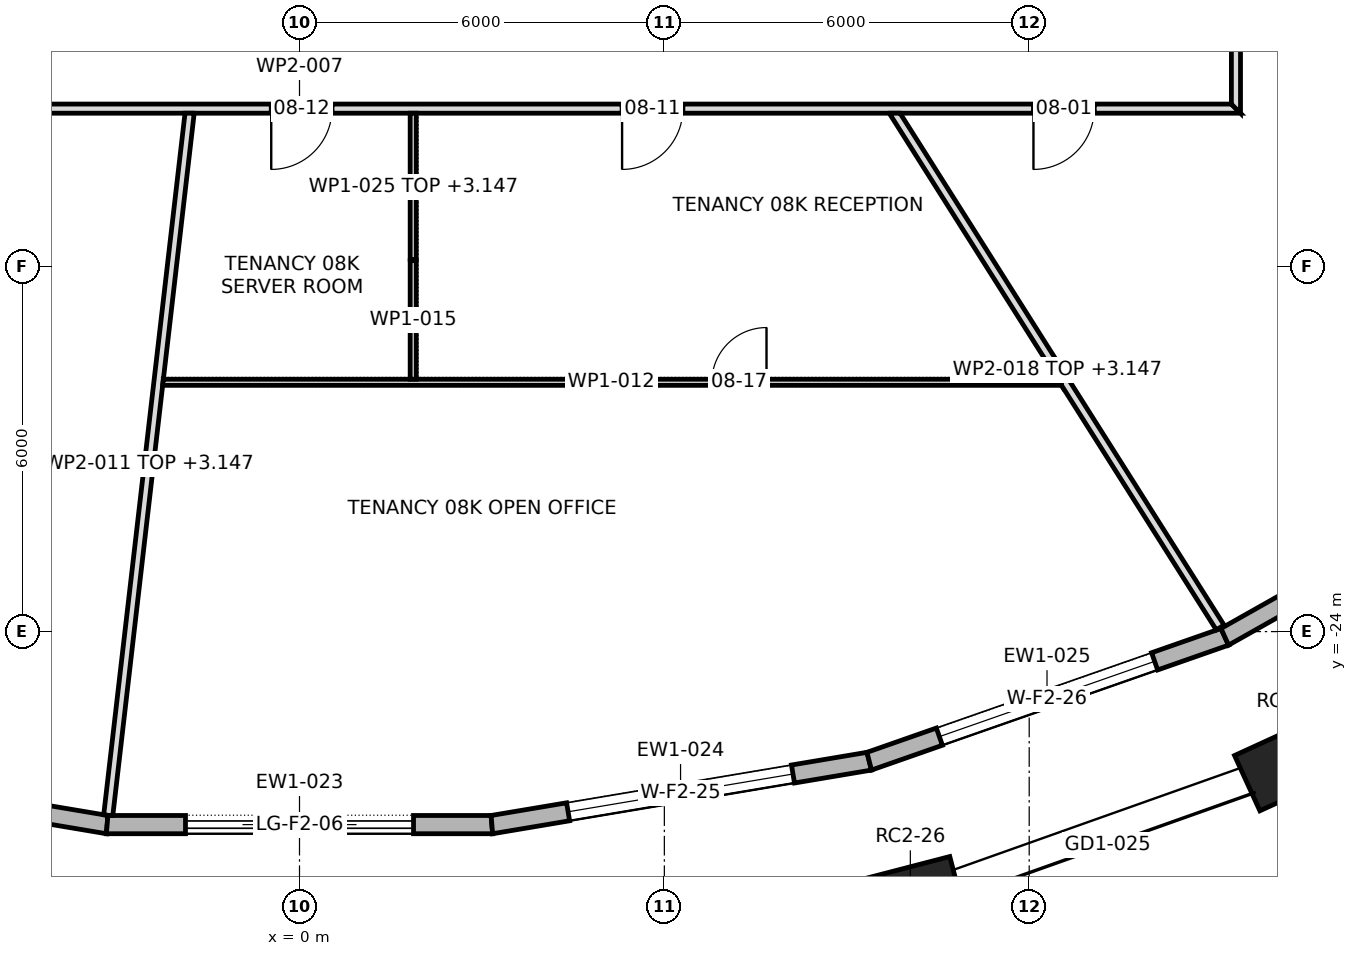
"""IFC4 building model, lengths in metres.
Left out: names, types, materials, properties, quantities, classifications, styles, units other than length and angle.
Written with IfcOpenShell. Run it as: python <this file> out.ifc"""

import sys

from ifc_helpers import new_model, si_unit, direction, frame, frame_2d, origin, origin_2d, place, context, subcontext, project, spatial, polyline, rectangle, outline, extrude, element, fill, save


model = new_model("IFC4")
c1 = context("Model", 3, precision=1e-05, world=origin(), true_north=direction((0.0, 1.0)))
c2 = subcontext(c1, "Body", "Model", "MODEL_VIEW")
j1 = project(units=[si_unit("LENGTHUNIT", "METRE"), si_unit("PLANEANGLEUNIT", "RADIAN")], contexts=[c1])
p1 = place(None, origin())
s1 = spatial("IfcSite", under=j1, at=p1, CompositionType="ELEMENT")
p2 = place(p1, origin())
s2 = spatial("IfcBuilding", under=s1, at=p2, CompositionType="ELEMENT")
p3 = place(p2, frame((0.0, 0.0, 125.5)))
s3 = spatial("IfcBuildingStorey", under=s2, at=p3, CompositionType="ELEMENT", Elevation=125.5)
for number, where, z_axis, x_axis in (
    (1, (10.045, -28.385, 0.0), (0.0, 0.0, 1.0), (0.968, 0.252, 0.0)),
    (2, (16.313, -26.159, 0.0), (0.0, 0.0, 1.0), (0.909, 0.417, 0.0)),
):
    element("IfcColumn", number, at=place(p3, frame(where, z_axis=z_axis, x_axis=x_axis)), inside=s3, PredefinedType="COLUMN", context=c2, shape_type="SweptSolid", body=[
        extrude(rectangle(XDim=1.6, YDim=1.0, at=origin_2d()), origin(), (0.0, 0.0, 1.0), 4.2),
    ])
p4 = place(p3, frame((-9.369, -26.131, 0.0), z_axis=(0.0, 0.0, 1.0), x_axis=(0.986176011722, -0.165701158427, 0.0)))
e3 = element("IfcWall", 3, at=p4, inside=s3, PredefinedType="STANDARD", context=c2, shape_type="SweptSolid", body=[
    extrude(outline(polyline([(-0.013, -0.15), (6.305, -0.15), (6.28, 0.15), (0.013, 0.15), (-0.013, -0.15)])), origin(), (0.0, 0.0, 1.0), 3.9),
])
p5 = place(p4, frame((1.271, 0.0, 0.6)))
e4 = element("IfcOpeningElement", 4, at=p5, cuts=e3, PredefinedType="OPENING", context=c2, shape_type="SweptSolid", body=[
    extrude(rectangle(XDim=3.75, YDim=2.85, at=frame_2d((1.875, 1.425))), frame((0.0, 0.162, 0.0), z_axis=(0.0, -1.0, 0.0), x_axis=(1.0, 0.0, 0.0)), (0.0, 0.0, 1.0), 0.324),
])
p6 = place(p3, frame((-3.164, -27.174, 0.0), z_axis=(0.0, 0.0, 1.0), x_axis=(1.0, 0.0, 0.0)))
e5 = element("IfcWall", 5, at=p6, inside=s3, PredefinedType="STANDARD", context=c2, shape_type="SweptSolid", body=[
    extrude(outline(polyline([(-0.012, -0.15), (6.34, -0.15), (6.315, 0.15), (0.012, 0.15), (-0.012, -0.15)])), origin(), (0.0, 0.0, 1.0), 3.9),
])
p7 = place(p6, frame((1.289, 0.0, 0.0)))
e6 = element("IfcOpeningElement", 6, at=p7, cuts=e5, PredefinedType="OPENING", context=c2, shape_type="SweptSolid", body=[
    extrude(rectangle(XDim=3.75, YDim=3.45, at=frame_2d((1.875, 1.725))), frame((0.0, 0.162, 0.0), z_axis=(0.0, -1.0, 0.0), x_axis=(1.0, 0.0, 0.0)), (0.0, 0.0, 1.0), 0.324),
])
p8 = place(p3, frame((3.164, -27.174, 0.0), z_axis=(0.0, 0.0, 1.0), x_axis=(0.986176011722, 0.165701158427, 0.0)))
e7 = element("IfcWall", 7, at=p8, inside=s3, PredefinedType="STANDARD", context=c2, shape_type="SweptSolid", body=[
    extrude(outline(polyline([(-0.012, -0.15), (6.305, -0.15), (6.28, 0.15), (0.012, 0.15), (-0.012, -0.15)])), origin(), (0.0, 0.0, 1.0), 3.9),
])
p9 = place(p8, frame((1.271, 0.0, 0.6)))
e8 = element("IfcOpeningElement", 8, at=p9, cuts=e7, PredefinedType="OPENING", context=c2, shape_type="SweptSolid", body=[
    extrude(rectangle(XDim=3.75, YDim=2.85, at=frame_2d((1.875, 1.425))), frame((0.0, 0.162, 0.0), z_axis=(0.0, -1.0, 0.0), x_axis=(1.0, 0.0, 0.0)), (0.0, 0.0, 1.0), 0.324),
])
p10 = place(p3, frame((9.369, -26.131, 0.0), z_axis=(0.0, 0.0, 1.0), x_axis=(0.94389706045, 0.330239820849, 0.0)))
e9 = element("IfcWall", 9, at=p10, inside=s3, PredefinedType="STANDARD", context=c2, shape_type="SweptSolid", body=[
    extrude(outline(polyline([(-0.013, -0.15), (6.208, -0.15), (6.181, 0.15), (0.013, 0.15), (-0.013, -0.15)])), origin(), (0.0, 0.0, 1.0), 3.9),
])
p11 = place(p10, frame((1.222, 0.0, 0.6)))
e10 = element("IfcOpeningElement", 10, at=p11, cuts=e9, PredefinedType="OPENING", context=c2, shape_type="SweptSolid", body=[
    extrude(rectangle(XDim=3.75, YDim=2.85, at=frame_2d((1.875, 1.425))), frame((0.0, 0.162, 0.0), z_axis=(0.0, -1.0, 0.0), x_axis=(1.0, 0.0, 0.0)), (0.0, 0.0, 1.0), 0.324),
])
p12 = place(p3, frame((15.216, -24.086, 0.0), z_axis=(0.0, 0.0, 1.0), x_axis=(0.870858332497, 0.491534093142, 0.0)))
e11 = element("IfcWall", 11, at=p12, inside=s3, PredefinedType="STANDARD", context=c2, shape_type="SweptSolid", body=[
    extrude(outline(polyline([(-0.013, -0.15), (6.058, -0.15), (6.03, 0.15), (0.013, 0.15), (-0.013, -0.15)])), origin(), (0.0, 0.0, 1.0), 3.9),
])
p13 = place(p12, frame((1.147, 0.0, 0.6)))
e12 = element("IfcOpeningElement", 12, at=p13, cuts=e11, PredefinedType="OPENING", context=c2, shape_type="SweptSolid", body=[
    extrude(rectangle(XDim=3.75, YDim=2.85, at=frame_2d((1.875, 1.425))), frame((0.0, 0.162, 0.0), z_axis=(0.0, -1.0, 0.0), x_axis=(1.0, 0.0, 0.0)), (0.0, 0.0, 1.0), 0.324),
])
p14 = place(p3, frame((-15.475, -15.4, 0.0), z_axis=(0.0, 0.0, 1.0), x_axis=(1.0, 0.0, 0.0)))
e13 = element("IfcWall", 13, at=p14, inside=s3, PredefinedType="PARTITIONING", context=c2, shape_type="SweptSolid", body=[
    extrude(outline(polyline([(0.0, -0.075), (1.935, -0.075), (3.869, -0.075), (5.803, -0.075), (7.738, -0.075), (9.672, -0.075), (11.606, -0.075), (13.541, -0.075), (15.475, -0.075), (17.409, -0.075), (19.344, -0.075), (21.278, -0.075), (23.212, -0.075), (25.147, -0.075), (27.081, -0.075), (29.016, -0.075), (30.95, -0.075), (30.8, 0.075), (28.885, 0.075), (26.969, 0.075), (25.053, 0.075), (23.138, 0.075), (21.222, 0.075), (19.306, 0.075), (17.391, 0.075), (15.475, 0.075), (13.56, 0.075), (11.644, 0.075), (9.728, 0.075), (7.812, 0.075), (5.897, 0.075), (3.981, 0.075), (2.066, 0.075), (0.15, 0.075), (0.0, -0.075)])), origin(), (0.0, 0.0, 1.0), 3.9),
])
p15 = place(p14, frame((27.545, 0.0, 0.0)))
e14 = element("IfcOpeningElement", 14, at=p15, cuts=e13, PredefinedType="OPENING", context=c2, shape_type="SweptSolid", body=[
    extrude(rectangle(XDim=1.0, YDim=2.1, at=frame_2d((0.5, 1.05))), frame((0.0, 0.087, 0.0), z_axis=(0.0, -1.0, 0.0), x_axis=(1.0, 0.0, 0.0)), (0.0, 0.0, 1.0), 0.174),
])
p16 = place(p14, frame((5.975, 0.0, 0.0)))
e15 = element("IfcOpeningElement", 15, at=p16, cuts=e13, PredefinedType="OPENING", context=c2, shape_type="SweptSolid", body=[
    extrude(rectangle(XDim=1.8, YDim=2.1, at=frame_2d((0.9, 1.05))), frame((0.0, 0.087, 0.0), z_axis=(0.0, -1.0, 0.0), x_axis=(1.0, 0.0, 0.0)), (0.0, 0.0, 1.0), 0.174),
])
p17 = place(p14, frame((20.78, 0.0, 0.0)))
e16 = element("IfcOpeningElement", 16, at=p17, cuts=e13, PredefinedType="OPENING", context=c2, shape_type="SweptSolid", body=[
    extrude(rectangle(XDim=1.0, YDim=2.1, at=frame_2d((0.5, 1.05))), frame((0.0, 0.087, 0.0), z_axis=(0.0, -1.0, 0.0), x_axis=(1.0, 0.0, 0.0)), (0.0, 0.0, 1.0), 0.174),
])
p18 = place(p14, frame((15.01, 0.0, 0.0)))
e17 = element("IfcOpeningElement", 17, at=p18, cuts=e13, PredefinedType="OPENING", context=c2, shape_type="SweptSolid", body=[
    extrude(rectangle(XDim=1.0, YDim=2.1, at=frame_2d((0.5, 1.05))), frame((0.0, 0.087, 0.0), z_axis=(0.0, -1.0, 0.0), x_axis=(1.0, 0.0, 0.0)), (0.0, 0.0, 1.0), 0.174),
])
p19 = place(p3, frame((-3.145, -27.021, 0.0), z_axis=(0.0, 0.0, 1.0), x_axis=(0.115127596958, 0.993350711692, 0.0)))
e18 = element("IfcWall", 18, at=p19, inside=s3, PredefinedType="PARTITIONING", context=c2, shape_type="SweptSolid", body=[
    extrude(outline(polyline([(0.006, -0.075), (1.808, -0.075), (3.611, -0.075), (5.414, -0.075), (7.217, -0.075), (7.228, -0.074), (7.228, -0.075), (8.696, -0.075), (10.164, -0.075), (11.632, -0.075), (11.632, -0.072), (11.615, 0.075), (9.679, 0.075), (7.743, 0.075), (5.807, 0.075), (3.872, 0.075), (1.936, 0.075), (0.0, 0.075), (0.0, -0.027), (0.006, -0.075)])), origin(), (0.0, 0.0, 1.0), 3.147),
])
p20 = place(p3, frame((-2.25, -19.9, 0.0), z_axis=(0.0, 0.0, 1.0), x_axis=(1.0, 0.0, 0.0)))
e19 = element("IfcWall", 19, at=p20, inside=s3, PredefinedType="PARTITIONING", context=c2, shape_type="SweptSolid", body=[
    extrude(outline(polyline([(14.781, -0.05), (14.781, -0.05), (14.77, -0.032), (14.77, -0.032), (14.718, 0.05), (12.96, 0.05), (11.202, 0.05), (9.444, 0.05), (7.686, 0.05), (5.928, 0.05), (4.17, 0.05), (4.17, 0.05), (4.07, 0.05), (4.07, 0.05), (2.717, 0.05), (1.364, 0.05), (0.011, 0.05), (0.0, -0.048), (0.0, -0.05), (1.848, -0.05), (3.695, -0.05), (5.543, -0.05), (7.391, -0.05), (9.238, -0.05), (11.086, -0.05), (12.933, -0.05), (14.781, -0.05)])), origin(), (0.0, 0.0, 1.0), 3.9),
])
p21 = place(p20, frame((9.03, 0.0, 0.0)))
e20 = element("IfcOpeningElement", 20, at=p21, cuts=e19, PredefinedType="OPENING", context=c2, shape_type="SweptSolid", body=[
    extrude(rectangle(XDim=0.9, YDim=2.1, at=frame_2d((0.45, 1.05))), frame((0.0, 0.062, 0.0), z_axis=(0.0, -1.0, 0.0), x_axis=(1.0, 0.0, 0.0)), (0.0, 0.0, 1.0), 0.124),
])
p22 = place(p3, frame((1.87, -19.85, 0.0), z_axis=(0.0, 0.0, 1.0), x_axis=(0.0, 1.0, 0.0)))
e21 = element("IfcWall", 21, at=p22, inside=s3, PredefinedType="PARTITIONING", context=c2, shape_type="SweptSolid", body=[
    extrude(rectangle(XDim=1.96, YDim=0.1, at=frame_2d((0.98, 0.0))), origin(), (0.0, 0.0, 1.0), 3.9),
])
p23 = place(p3, frame((9.762, -15.435, 0.0), z_axis=(0.0, 0.0, 1.0), x_axis=(0.534830284385, -0.844959506074, 0.0)))
e22 = element("IfcWall", 22, at=p23, inside=s3, PredefinedType="PARTITIONING", context=c2, shape_type="SweptSolid", body=[
    extrude(outline(polyline([(0.0, -0.075), (1.726, -0.075), (3.452, -0.075), (5.177, -0.075), (5.211, -0.022), (5.295, -0.075), (6.883, -0.075), (8.47, -0.075), (10.057, -0.075), (10.057, 0.075), (8.064, 0.075), (6.072, 0.075), (4.08, 0.075), (2.087, 0.075), (0.095, 0.075), (0.0, -0.075), (0.0, -0.075)])), origin(), (0.0, 0.0, 1.0), 3.147),
])
p24 = place(p3, frame((15.4, -15.475, 0.0), z_axis=(0.0, 0.0, 1.0), x_axis=(0.0, 1.0, 0.0)))
e23 = element("IfcWall", 23, at=p24, inside=s3, PredefinedType="PARTITIONING", context=c2, shape_type="SweptSolid", body=[
    extrude(outline(polyline([(0.0, -0.075), (1.935, -0.075), (3.869, -0.075), (5.803, -0.075), (7.738, -0.075), (9.672, -0.075), (11.606, -0.075), (13.541, -0.075), (15.475, -0.075), (17.409, -0.075), (19.344, -0.075), (21.278, -0.075), (23.212, -0.075), (25.147, -0.075), (27.081, -0.075), (29.016, -0.075), (30.95, -0.075), (30.8, 0.075), (28.885, 0.075), (26.969, 0.075), (25.053, 0.075), (23.138, 0.075), (21.222, 0.075), (19.306, 0.075), (17.391, 0.075), (15.475, 0.075), (13.56, 0.075), (11.644, 0.075), (9.728, 0.075), (7.812, 0.075), (5.897, 0.075), (3.981, 0.075), (2.066, 0.075), (0.15, 0.075), (0.0, -0.075)])), origin(), (0.0, 0.0, 1.0), 3.9),
])
p25 = place(p24, frame((8.595, 0.0, 0.0)))
e24 = element("IfcOpeningElement", 24, at=p25, cuts=e23, PredefinedType="OPENING", context=c2, shape_type="SweptSolid", body=[
    extrude(rectangle(XDim=1.8, YDim=2.1, at=frame_2d((0.9, 1.05))), frame((0.0, 0.087, 0.0), z_axis=(0.0, -1.0, 0.0), x_axis=(1.0, 0.0, 0.0)), (0.0, 0.0, 1.0), 0.174),
])
p26 = place(p24, frame((17.81, 0.0, 0.0)))
e25 = element("IfcOpeningElement", 25, at=p26, cuts=e23, PredefinedType="OPENING", context=c2, shape_type="SweptSolid", body=[
    extrude(rectangle(XDim=1.0, YDim=2.1, at=frame_2d((0.5, 1.05))), frame((0.0, 0.087, 0.0), z_axis=(0.0, -1.0, 0.0), x_axis=(1.0, 0.0, 0.0)), (0.0, 0.0, 1.0), 0.174),
])
p27 = place(p24, frame((25.75, 0.0, 0.0)))
e26 = element("IfcOpeningElement", 26, at=p27, cuts=e23, PredefinedType="OPENING", context=c2, shape_type="SweptSolid", body=[
    extrude(rectangle(XDim=1.8, YDim=2.1, at=frame_2d((0.9, 1.05))), frame((0.0, 0.087, 0.0), z_axis=(0.0, -1.0, 0.0), x_axis=(1.0, 0.0, 0.0)), (0.0, 0.0, 1.0), 0.174),
])
p28 = place(p3, frame((15.433, -10.702, 0.0), z_axis=(0.0, 0.0, 1.0), x_axis=(0.82200427234, -0.56948132213, 0.0)))
e27 = element("IfcWall", 27, at=p28, inside=s3, PredefinedType="PARTITIONING", context=c2, shape_type="SweptSolid", body=[
    extrude(outline(polyline([(0.104, -0.075), (1.992, -0.075), (3.881, -0.075), (5.77, -0.075), (7.659, -0.075), (9.548, -0.075), (11.437, -0.075), (11.457, 0.0), (11.461, 0.071), (11.461, 0.075), (9.551, 0.075), (7.641, 0.075), (5.731, 0.075), (3.821, 0.075), (1.91, 0.075), (0.0, 0.075), (0.0, 0.074), (0.104, -0.075)])), origin(), (0.0, 0.0, 1.0), 3.147),
])
p29 = place(p3, frame((1.87, -17.89, 0.0), z_axis=(0.0, 0.0, 1.0), x_axis=(0.0, 1.0, 0.0)))
e28 = element("IfcWall", 28, at=p29, inside=s3, PredefinedType="PARTITIONING", context=c2, shape_type="SweptSolid", body=[
    extrude(rectangle(XDim=2.415, YDim=0.1, at=frame_2d((1.208, 0.0))), origin(), (0.0, 0.0, 1.0), 3.147),
])
p30 = place(p7, origin())
e29 = element("IfcDoor", 29, at=p30, inside=s3, OperationType="DOUBLE_DOOR_SLIDING", PredefinedType="DOOR", context=c2, shape_type="SweptSolid", body=[
    extrude(rectangle(XDim=3.75, YDim=3.45, at=frame_2d((1.875, 1.725))), frame((0.0, 0.025, 0.0), z_axis=(0.0, -1.0, 0.0), x_axis=(1.0, 0.0, 0.0)), (0.0, 0.0, 1.0), 0.05),
])
fill(e6, e29)
p31 = place(p9, origin())
e30 = element("IfcWindow", 30, at=p31, inside=s3, PartitioningType="TRIPLE_PANEL_VERTICAL", PredefinedType="WINDOW", context=c2, shape_type="SweptSolid", body=[
    extrude(rectangle(XDim=3.75, YDim=2.85, at=frame_2d((1.875, 1.425))), frame((0.0, 0.03, 0.0), z_axis=(0.0, -1.0, 0.0), x_axis=(1.0, 0.0, 0.0)), (0.0, 0.0, 1.0), 0.06),
])
fill(e8, e30)
p32 = place(p11, origin())
e31 = element("IfcWindow", 31, at=p32, inside=s3, PartitioningType="TRIPLE_PANEL_VERTICAL", PredefinedType="WINDOW", context=c2, shape_type="SweptSolid", body=[
    extrude(rectangle(XDim=3.75, YDim=2.85, at=frame_2d((1.875, 1.425))), frame((0.0, 0.03, 0.0), z_axis=(0.0, -1.0, 0.0), x_axis=(1.0, 0.0, 0.0)), (0.0, 0.0, 1.0), 0.06),
])
fill(e10, e31)
p33 = place(p15, frame((1.0, 0.0, 0.0), z_axis=(0.0, 0.0, 1.0), x_axis=(-1.0, 0.0, 0.0)))
e32 = element("IfcDoor", 32, at=p33, inside=s3, OperationType="SINGLE_SWING_LEFT", PredefinedType="DOOR", context=c2, shape_type="SweptSolid", body=[
    extrude(rectangle(XDim=1.0, YDim=2.1, at=frame_2d((0.5, 1.05))), frame((0.0, 0.025, 0.0), z_axis=(0.0, -1.0, 0.0), x_axis=(1.0, 0.0, 0.0)), (0.0, 0.0, 1.0), 0.05),
])
fill(e14, e32)
p34 = place(p17, frame((1.0, 0.0, 0.0), z_axis=(0.0, 0.0, 1.0), x_axis=(-1.0, 0.0, 0.0)))
e33 = element("IfcDoor", 33, at=p34, inside=s3, OperationType="SINGLE_SWING_LEFT", PredefinedType="DOOR", context=c2, shape_type="SweptSolid", body=[
    extrude(rectangle(XDim=1.0, YDim=2.1, at=frame_2d((0.5, 1.05))), frame((0.0, 0.025, 0.0), z_axis=(0.0, -1.0, 0.0), x_axis=(1.0, 0.0, 0.0)), (0.0, 0.0, 1.0), 0.05),
])
fill(e16, e33)
p35 = place(p18, frame((1.0, 0.0, 0.0), z_axis=(0.0, 0.0, 1.0), x_axis=(-1.0, 0.0, 0.0)))
e34 = element("IfcDoor", 34, at=p35, inside=s3, OperationType="SINGLE_SWING_LEFT", PredefinedType="DOOR", context=c2, shape_type="SweptSolid", body=[
    extrude(rectangle(XDim=1.0, YDim=2.1, at=frame_2d((0.5, 1.05))), frame((0.0, 0.025, 0.0), z_axis=(0.0, -1.0, 0.0), x_axis=(1.0, 0.0, 0.0)), (0.0, 0.0, 1.0), 0.05),
])
fill(e17, e34)
p36 = place(p21, origin())
e35 = element("IfcDoor", 35, at=p36, inside=s3, OperationType="SINGLE_SWING_LEFT", PredefinedType="DOOR", context=c2, shape_type="SweptSolid", body=[
    extrude(rectangle(XDim=0.9, YDim=2.1, at=frame_2d((0.45, 1.05))), frame((0.0, 0.025, 0.0), z_axis=(0.0, -1.0, 0.0), x_axis=(1.0, 0.0, 0.0)), (0.0, 0.0, 1.0), 0.05),
])
fill(e20, e35)
save(model, sys.argv[1])
